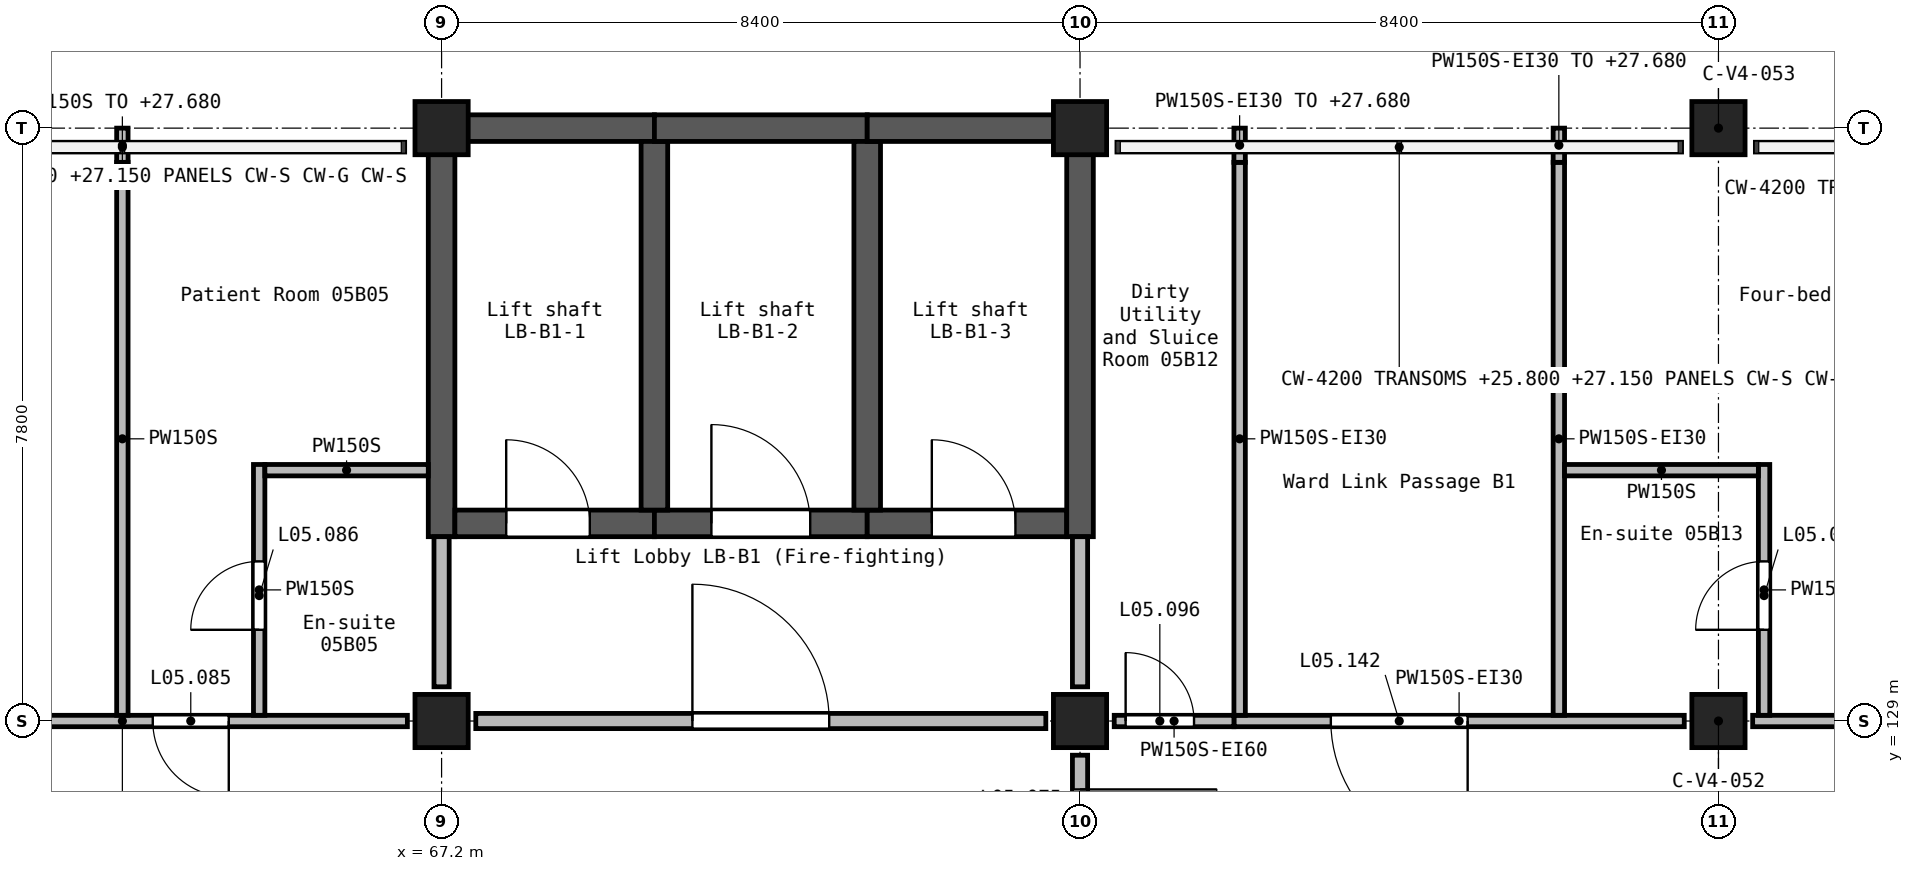
"""IFC4 building model, lengths in metres.
Left out: names, types, materials, properties, quantities, classifications, styles, units other than length and angle.
Written with IfcOpenShell. Run it as: python <this file> out.ifc"""

import sys

from ifc_helpers import new_model, si_unit, direction, frame, frame_2d, origin, origin_2d, place, context, subcontext, project, spatial, rectangle, extrude, element, fill, save


model = new_model("IFC4")
c1 = context("Model", 3, precision=1e-05, world=origin(), true_north=direction((0.0, 1.0)))
c2 = subcontext(c1, "Body", "Model", "MODEL_VIEW")
j1 = project(units=[si_unit("LENGTHUNIT", "METRE"), si_unit("PLANEANGLEUNIT", "RADIAN")], contexts=[c1])
p1 = place(None, origin())
s1 = spatial("IfcSite", under=j1, at=p1, CompositionType="ELEMENT")
p2 = place(p1, origin())
s2 = spatial("IfcBuilding", under=s1, at=p2, CompositionType="ELEMENT")
p3 = place(p2, frame((0.0, 0.0, 24.9)))
s3 = spatial("IfcBuildingStorey", under=s2, at=p3, CompositionType="ELEMENT", Elevation=24.9)
for number, where, z_axis, x_axis in (
    (1, (67.2, 129.0, 0.0), (0.0, 0.0, 1.0), (1.0, 0.0, 0.0)),
    (2, (67.2, 136.8, 0.0), (0.0, 0.0, 1.0), (1.0, 0.0, 0.0)),
    (3, (75.6, 129.0, 0.0), (0.0, 0.0, 1.0), (1.0, 0.0, 0.0)),
    (4, (75.6, 136.8, 0.0), (0.0, 0.0, 1.0), (1.0, 0.0, 0.0)),
    (5, (84.0, 129.0, 0.0), (0.0, 0.0, 1.0), (1.0, 0.0, 0.0)),
    (6, (84.0, 136.8, 0.0), (0.0, 0.0, 1.0), (1.0, 0.0, 0.0)),
):
    element("IfcColumn", number, at=place(p3, frame(where, z_axis=z_axis, x_axis=x_axis)), inside=s3, PredefinedType="COLUMN", context=c2, shape_type="SweptSolid", body=[
        extrude(rectangle(XDim=0.7, YDim=0.7, at=origin_2d()), origin(), (0.0, 0.0, 1.0), 3.9),
    ])
p4 = place(p3, frame((67.025, 136.8, 0.0), z_axis=(0.0, 0.0, 1.0), x_axis=(1.0, 0.0, 0.0)))
e7 = element("IfcWall", 7, at=p4, inside=s3, PredefinedType="SHEAR", context=c2, shape_type="SweptSolid", body=[
    extrude(rectangle(XDim=2.975, YDim=0.35, at=frame_2d((1.488, 0.0))), origin(), (0.0, 0.0, 1.0), 3.9),
])
p5 = place(p3, frame((67.2, 131.425, 0.0), z_axis=(0.0, 0.0, 1.0), x_axis=(0.0, 1.0, 0.0)))
e8 = element("IfcWall", 8, at=p5, inside=s3, PredefinedType="SHEAR", context=c2, shape_type="SweptSolid", body=[
    extrude(rectangle(XDim=5.2, YDim=0.35, at=frame_2d((2.6, 0.0))), origin(), (0.0, 0.0, 1.0), 3.9),
])
p6 = place(p3, frame((67.375, 131.6, 0.0), z_axis=(0.0, 0.0, 1.0), x_axis=(1.0, 0.0, 0.0)))
e9 = element("IfcWall", 9, at=p6, inside=s3, PredefinedType="SHEAR", context=c2, shape_type="SweptSolid", body=[
    extrude(rectangle(XDim=2.625, YDim=0.35, at=frame_2d((1.312, 0.0))), origin(), (0.0, 0.0, 1.0), 3.9),
])
p7 = place(p6, frame((0.675, 0.0, 0.0)))
e10 = element("IfcOpeningElement", 10, at=p7, cuts=e9, PredefinedType="OPENING", context=c2, shape_type="SweptSolid", body=[
    extrude(rectangle(XDim=1.1, YDim=2.1, at=frame_2d((0.55, 1.05))), frame((0.0, 0.185, 0.0), z_axis=(0.0, -1.0, 0.0), x_axis=(1.0, 0.0, 0.0)), (0.0, 0.0, 1.0), 0.37),
])
p8 = place(p3, frame((70.0, 131.6, 0.0), z_axis=(0.0, 0.0, 1.0), x_axis=(1.0, 0.0, 0.0)))
e11 = element("IfcWall", 11, at=p8, inside=s3, PredefinedType="SHEAR", context=c2, shape_type="SweptSolid", body=[
    extrude(rectangle(XDim=2.8, YDim=0.35, at=frame_2d((1.4, 0.0))), origin(), (0.0, 0.0, 1.0), 3.9),
])
p9 = place(p8, frame((0.75, 0.0, 0.0)))
e12 = element("IfcOpeningElement", 12, at=p9, cuts=e11, PredefinedType="OPENING", context=c2, shape_type="SweptSolid", body=[
    extrude(rectangle(XDim=1.3, YDim=2.1, at=frame_2d((0.65, 1.05))), frame((0.0, 0.185, 0.0), z_axis=(0.0, -1.0, 0.0), x_axis=(1.0, 0.0, 0.0)), (0.0, 0.0, 1.0), 0.37),
])
p10 = place(p3, frame((70.0, 131.775, 0.0), z_axis=(0.0, 0.0, 1.0), x_axis=(0.0, 1.0, 0.0)))
e13 = element("IfcWall", 13, at=p10, inside=s3, PredefinedType="SHEAR", context=c2, shape_type="SweptSolid", body=[
    extrude(rectangle(XDim=4.85, YDim=0.35, at=frame_2d((2.425, 0.0))), origin(), (0.0, 0.0, 1.0), 3.9),
])
p11 = place(p3, frame((70.0, 136.8, 0.0), z_axis=(0.0, 0.0, 1.0), x_axis=(1.0, 0.0, 0.0)))
e14 = element("IfcWall", 14, at=p11, inside=s3, PredefinedType="SHEAR", context=c2, shape_type="SweptSolid", body=[
    extrude(rectangle(XDim=2.8, YDim=0.35, at=frame_2d((1.4, 0.0))), origin(), (0.0, 0.0, 1.0), 3.9),
])
p12 = place(p3, frame((72.8, 131.6, 0.0), z_axis=(0.0, 0.0, 1.0), x_axis=(1.0, 0.0, 0.0)))
e15 = element("IfcWall", 15, at=p12, inside=s3, PredefinedType="SHEAR", context=c2, shape_type="SweptSolid", body=[
    extrude(rectangle(XDim=2.625, YDim=0.35, at=frame_2d((1.312, 0.0))), origin(), (0.0, 0.0, 1.0), 3.9),
])
p13 = place(p12, frame((0.85, 0.0, 0.0)))
e16 = element("IfcOpeningElement", 16, at=p13, cuts=e15, PredefinedType="OPENING", context=c2, shape_type="SweptSolid", body=[
    extrude(rectangle(XDim=1.1, YDim=2.1, at=frame_2d((0.55, 1.05))), frame((0.0, 0.185, 0.0), z_axis=(0.0, -1.0, 0.0), x_axis=(1.0, 0.0, 0.0)), (0.0, 0.0, 1.0), 0.37),
])
p14 = place(p3, frame((72.8, 131.775, 0.0), z_axis=(0.0, 0.0, 1.0), x_axis=(0.0, 1.0, 0.0)))
e17 = element("IfcWall", 17, at=p14, inside=s3, PredefinedType="SHEAR", context=c2, shape_type="SweptSolid", body=[
    extrude(rectangle(XDim=4.85, YDim=0.35, at=frame_2d((2.425, 0.0))), origin(), (0.0, 0.0, 1.0), 3.9),
])
p15 = place(p3, frame((72.8, 136.8, 0.0), z_axis=(0.0, 0.0, 1.0), x_axis=(1.0, 0.0, 0.0)))
e18 = element("IfcWall", 18, at=p15, inside=s3, PredefinedType="SHEAR", context=c2, shape_type="SweptSolid", body=[
    extrude(rectangle(XDim=2.625, YDim=0.35, at=frame_2d((1.312, 0.0))), origin(), (0.0, 0.0, 1.0), 3.9),
])
p16 = place(p3, frame((75.6, 131.425, 0.0), z_axis=(0.0, 0.0, 1.0), x_axis=(0.0, 1.0, 0.0)))
e19 = element("IfcWall", 19, at=p16, inside=s3, PredefinedType="SHEAR", context=c2, shape_type="SweptSolid", body=[
    extrude(rectangle(XDim=5.55, YDim=0.35, at=frame_2d((2.775, 0.0))), origin(), (0.0, 0.0, 1.0), 3.9),
])
p17 = place(p3, frame((75.6, 131.425, 0.0), z_axis=(0.0, 0.0, 1.0), x_axis=(0.0, -1.0, 0.0)))
e20 = element("IfcWall", 20, at=p17, inside=s3, PredefinedType="SOLIDWALL", context=c2, shape_type="SweptSolid", body=[
    extrude(rectangle(XDim=1.975, YDim=0.2, at=frame_2d((0.988, 0.0))), origin(), (0.0, 0.0, 1.0), 3.6),
])
p18 = place(p3, frame((75.6, 128.55, 0.0), z_axis=(0.0, 0.0, 1.0), x_axis=(0.0, -1.0, 0.0)))
e21 = element("IfcWall", 21, at=p18, inside=s3, PredefinedType="SOLIDWALL", context=c2, shape_type="SweptSolid", body=[
    extrude(rectangle(XDim=2.7, YDim=0.2, at=frame_2d((1.35, 0.0))), origin(), (0.0, 0.0, 1.0), 3.6),
])
p19 = place(p18, frame((0.45, 0.0, 0.0)))
e22 = element("IfcOpeningElement", 22, at=p19, cuts=e21, PredefinedType="OPENING", context=c2, shape_type="SweptSolid", body=[
    extrude(rectangle(XDim=1.8, YDim=2.1, at=frame_2d((0.9, 1.05))), frame((0.0, 0.11, 0.0), z_axis=(0.0, -1.0, 0.0), x_axis=(1.0, 0.0, 0.0)), (0.0, 0.0, 1.0), 0.22),
])
p20 = place(p3, frame((67.65, 129.0, 0.0), z_axis=(0.0, 0.0, 1.0), x_axis=(1.0, 0.0, 0.0)))
e23 = element("IfcWall", 23, at=p20, inside=s3, PredefinedType="SOLIDWALL", context=c2, shape_type="SweptSolid", body=[
    extrude(rectangle(XDim=7.5, YDim=0.2, at=frame_2d((3.75, 0.0))), origin(), (0.0, 0.0, 1.0), 3.6),
])
p21 = place(p20, frame((2.85, 0.0, 0.0)))
e24 = element("IfcOpeningElement", 24, at=p21, cuts=e23, PredefinedType="OPENING", context=c2, shape_type="SweptSolid", body=[
    extrude(rectangle(XDim=1.8, YDim=2.1, at=frame_2d((0.9, 1.05))), frame((0.0, 0.11, 0.0), z_axis=(0.0, -1.0, 0.0), x_axis=(1.0, 0.0, 0.0)), (0.0, 0.0, 1.0), 0.22),
])
p22 = place(p3, frame((67.2, 129.45, 0.0), z_axis=(0.0, 0.0, 1.0), x_axis=(0.0, 1.0, 0.0)))
e25 = element("IfcWall", 25, at=p22, inside=s3, PredefinedType="SOLIDWALL", context=c2, shape_type="SweptSolid", body=[
    extrude(rectangle(XDim=1.975, YDim=0.2, at=frame_2d((0.988, 0.0))), origin(), (0.0, 0.0, 1.0), 3.6),
])
p23 = place(p3, frame((91.95, 129.0, 0.0), z_axis=(0.0, 0.0, 1.0), x_axis=(-1.0, 0.0, 0.0)))
e26 = element("IfcWall", 26, at=p23, inside=s3, PredefinedType="PARTITIONING", context=c2, shape_type="SweptSolid", body=[
    extrude(rectangle(XDim=7.5, YDim=0.15, at=frame_2d((3.75, 0.0))), origin(), (0.0, 0.0, 1.0), 3.6),
])
p24 = place(p23, frame((4.0, 0.0, 0.0)))
e27 = element("IfcOpeningElement", 27, at=p24, cuts=e26, PredefinedType="OPENING", context=c2, shape_type="SweptSolid", body=[
    extrude(rectangle(XDim=1.0, YDim=2.1, at=frame_2d((0.5, 1.05))), frame((0.0, 0.085, 0.0), z_axis=(0.0, -1.0, 0.0), x_axis=(1.0, 0.0, 0.0)), (0.0, 0.0, 1.0), 0.17),
])
p25 = place(p3, frame((83.55, 129.0, 0.0), z_axis=(0.0, 0.0, 1.0), x_axis=(-1.0, 0.0, 0.0)))
e28 = element("IfcWall", 28, at=p25, inside=s3, PredefinedType="PARTITIONING", context=c2, shape_type="SweptSolid", body=[
    extrude(rectangle(XDim=5.925, YDim=0.15, at=frame_2d((2.962, 0.0))), origin(), (0.0, 0.0, 1.0), 3.6),
])
p26 = place(p25, frame((2.85, 0.0, 0.0)))
e29 = element("IfcOpeningElement", 29, at=p26, cuts=e28, PredefinedType="OPENING", context=c2, shape_type="SweptSolid", body=[
    extrude(rectangle(XDim=1.8, YDim=2.1, at=frame_2d((0.9, 1.05))), frame((0.0, 0.085, 0.0), z_axis=(0.0, -1.0, 0.0), x_axis=(1.0, 0.0, 0.0)), (0.0, 0.0, 1.0), 0.17),
])
p27 = place(p3, frame((66.75, 129.0, 0.0), z_axis=(0.0, 0.0, 1.0), x_axis=(-1.0, 0.0, 0.0)))
e30 = element("IfcWall", 30, at=p27, inside=s3, PredefinedType="PARTITIONING", context=c2, shape_type="SweptSolid", body=[
    extrude(rectangle(XDim=7.5, YDim=0.15, at=frame_2d((3.75, 0.0))), origin(), (0.0, 0.0, 1.0), 3.6),
])
p28 = place(p27, frame((5.05, 0.0, 0.0)))
e31 = element("IfcOpeningElement", 31, at=p28, cuts=e30, PredefinedType="OPENING", context=c2, shape_type="SweptSolid", body=[
    extrude(rectangle(XDim=1.0, YDim=2.1, at=frame_2d((0.5, 1.05))), frame((0.0, 0.085, 0.0), z_axis=(0.0, -1.0, 0.0), x_axis=(1.0, 0.0, 0.0)), (0.0, 0.0, 1.0), 0.17),
])
p29 = place(p27, frame((2.35, 0.0, 0.0)))
e32 = element("IfcOpeningElement", 32, at=p29, cuts=e30, PredefinedType="OPENING", context=c2, shape_type="SweptSolid", body=[
    extrude(rectangle(XDim=1.0, YDim=2.1, at=frame_2d((0.5, 1.05))), frame((0.0, 0.085, 0.0), z_axis=(0.0, -1.0, 0.0), x_axis=(1.0, 0.0, 0.0)), (0.0, 0.0, 1.0), 0.17),
])
p30 = place(p3, frame((77.7, 129.075, 0.0), z_axis=(0.0, 0.0, 1.0), x_axis=(0.0, 1.0, 0.0)))
e33 = element("IfcWall", 33, at=p30, inside=s3, PredefinedType="PARTITIONING", context=c2, shape_type="SweptSolid", body=[
    extrude(rectangle(XDim=7.275, YDim=0.15, at=frame_2d((3.638, 0.0))), origin(), (0.0, 0.0, 1.0), 3.6),
])
p31 = place(p3, frame((77.7, 136.35, 0.0), z_axis=(0.0, 0.0, 1.0), x_axis=(0.0, 1.0, 0.0)))
e34 = element("IfcWall", 34, at=p31, inside=s3, PredefinedType="PARTITIONING", context=c2, shape_type="SweptSolid", body=[
    extrude(rectangle(XDim=0.45, YDim=0.15, at=frame_2d((0.225, 0.0))), origin(), (0.0, 0.0, 1.0), 2.78),
])
p32 = place(p3, frame((81.9, 129.075, 0.0), z_axis=(0.0, 0.0, 1.0), x_axis=(0.0, 1.0, 0.0)))
e35 = element("IfcWall", 35, at=p32, inside=s3, PredefinedType="PARTITIONING", context=c2, shape_type="SweptSolid", body=[
    extrude(rectangle(XDim=7.275, YDim=0.15, at=frame_2d((3.638, 0.0))), origin(), (0.0, 0.0, 1.0), 3.6),
])
p33 = place(p3, frame((81.9, 136.35, 0.0), z_axis=(0.0, 0.0, 1.0), x_axis=(0.0, 1.0, 0.0)))
e36 = element("IfcWall", 36, at=p33, inside=s3, PredefinedType="PARTITIONING", context=c2, shape_type="SweptSolid", body=[
    extrude(rectangle(XDim=0.45, YDim=0.15, at=frame_2d((0.225, 0.0))), origin(), (0.0, 0.0, 1.0), 2.78),
])
p34 = place(p3, frame((76.05, 129.0, 0.0), z_axis=(0.0, 0.0, 1.0), x_axis=(1.0, 0.0, 0.0)))
e37 = element("IfcWall", 37, at=p34, inside=s3, PredefinedType="PARTITIONING", context=c2, shape_type="SweptSolid", body=[
    extrude(rectangle(XDim=1.575, YDim=0.15, at=frame_2d((0.788, 0.0))), origin(), (0.0, 0.0, 1.0), 3.6),
])
p35 = place(p34, frame((0.15, 0.0, 0.0)))
e38 = element("IfcOpeningElement", 38, at=p35, cuts=e37, PredefinedType="OPENING", context=c2, shape_type="SweptSolid", body=[
    extrude(rectangle(XDim=0.9, YDim=2.1, at=frame_2d((0.45, 1.05))), frame((0.0, 0.085, 0.0), z_axis=(0.0, -1.0, 0.0), x_axis=(1.0, 0.0, 0.0)), (0.0, 0.0, 1.0), 0.17),
])
p36 = place(p3, frame((63.0, 129.075, 0.0), z_axis=(0.0, 0.0, 1.0), x_axis=(0.0, 1.0, 0.0)))
e39 = element("IfcWall", 39, at=p36, inside=s3, PredefinedType="PARTITIONING", context=c2, shape_type="SweptSolid", body=[
    extrude(rectangle(XDim=7.275, YDim=0.15, at=frame_2d((3.638, 0.0))), origin(), (0.0, 0.0, 1.0), 3.6),
])
p37 = place(p3, frame((63.0, 136.35, 0.0), z_axis=(0.0, 0.0, 1.0), x_axis=(0.0, 1.0, 0.0)))
e40 = element("IfcWall", 40, at=p37, inside=s3, PredefinedType="PARTITIONING", context=c2, shape_type="SweptSolid", body=[
    extrude(rectangle(XDim=0.45, YDim=0.15, at=frame_2d((0.225, 0.0))), origin(), (0.0, 0.0, 1.0), 2.78),
])
p38 = place(p3, frame((64.8, 129.075, 0.0), z_axis=(0.0, 0.0, 1.0), x_axis=(0.0, 1.0, 0.0)))
e41 = element("IfcWall", 41, at=p38, inside=s3, PredefinedType="PARTITIONING", context=c2, shape_type="SweptSolid", body=[
    extrude(rectangle(XDim=3.3, YDim=0.15, at=frame_2d((1.65, 0.0))), origin(), (0.0, 0.0, 1.0), 3.6),
])
p39 = place(p38, frame((1.125, 0.0, 0.0)))
e42 = element("IfcOpeningElement", 42, at=p39, cuts=e41, PredefinedType="OPENING", context=c2, shape_type="SweptSolid", body=[
    extrude(rectangle(XDim=0.9, YDim=2.1, at=frame_2d((0.45, 1.05))), frame((0.0, 0.085, 0.0), z_axis=(0.0, -1.0, 0.0), x_axis=(1.0, 0.0, 0.0)), (0.0, 0.0, 1.0), 0.17),
])
p40 = place(p3, frame((84.6, 129.075, 0.0), z_axis=(0.0, 0.0, 1.0), x_axis=(0.0, 1.0, 0.0)))
e43 = element("IfcWall", 43, at=p40, inside=s3, PredefinedType="PARTITIONING", context=c2, shape_type="SweptSolid", body=[
    extrude(rectangle(XDim=3.3, YDim=0.15, at=frame_2d((1.65, 0.0))), origin(), (0.0, 0.0, 1.0), 3.6),
])
p41 = place(p40, frame((1.125, 0.0, 0.0)))
e44 = element("IfcOpeningElement", 44, at=p41, cuts=e43, PredefinedType="OPENING", context=c2, shape_type="SweptSolid", body=[
    extrude(rectangle(XDim=0.9, YDim=2.1, at=frame_2d((0.45, 1.05))), frame((0.0, 0.085, 0.0), z_axis=(0.0, -1.0, 0.0), x_axis=(1.0, 0.0, 0.0)), (0.0, 0.0, 1.0), 0.17),
])
p42 = place(p3, frame((81.975, 132.3, 0.0), z_axis=(0.0, 0.0, 1.0), x_axis=(1.0, 0.0, 0.0)))
e45 = element("IfcWall", 45, at=p42, inside=s3, PredefinedType="PARTITIONING", context=c2, shape_type="SweptSolid", body=[
    extrude(rectangle(XDim=2.55, YDim=0.15, at=frame_2d((1.275, 0.0))), origin(), (0.0, 0.0, 1.0), 3.6),
])
p43 = place(p3, frame((64.875, 132.3, 0.0), z_axis=(0.0, 0.0, 1.0), x_axis=(1.0, 0.0, 0.0)))
e46 = element("IfcWall", 46, at=p43, inside=s3, PredefinedType="PARTITIONING", context=c2, shape_type="SweptSolid", body=[
    extrude(rectangle(XDim=2.15, YDim=0.15, at=frame_2d((1.075, 0.0))), origin(), (0.0, 0.0, 1.0), 3.6),
])
p44 = place(p19, origin())
e47 = element("IfcDoor", 47, at=p44, inside=s3, OperationType="DOUBLE_DOOR_SINGLE_SWING", PredefinedType="DOOR", context=c2, shape_type="SweptSolid", body=[
    extrude(rectangle(XDim=1.8, YDim=2.1, at=frame_2d((0.9, 1.05))), frame((0.0, 0.025, 0.0), z_axis=(0.0, -1.0, 0.0), x_axis=(1.0, 0.0, 0.0)), (0.0, 0.0, 1.0), 0.05),
])
fill(e22, e47)
p45 = place(p29, frame((1.0, 0.0, 0.0), z_axis=(0.0, 0.0, 1.0), x_axis=(-1.0, 0.0, 0.0)))
e48 = element("IfcDoor", 48, at=p45, inside=s3, OperationType="SINGLE_SWING_RIGHT", PredefinedType="DOOR", context=c2, shape_type="SweptSolid", body=[
    extrude(rectangle(XDim=1.0, YDim=2.1, at=frame_2d((0.5, 1.05))), frame((0.0, 0.025, 0.0), z_axis=(0.0, -1.0, 0.0), x_axis=(1.0, 0.0, 0.0)), (0.0, 0.0, 1.0), 0.05),
])
fill(e32, e48)
p46 = place(p39, frame((0.9, 0.0, 0.0), z_axis=(0.0, 0.0, 1.0), x_axis=(-1.0, 0.0, 0.0)))
e49 = element("IfcDoor", 49, at=p46, inside=s3, OperationType="SINGLE_SWING_RIGHT", PredefinedType="DOOR", context=c2, shape_type="SweptSolid", body=[
    extrude(rectangle(XDim=0.9, YDim=2.1, at=frame_2d((0.45, 1.05))), frame((0.0, 0.025, 0.0), z_axis=(0.0, -1.0, 0.0), x_axis=(1.0, 0.0, 0.0)), (0.0, 0.0, 1.0), 0.05),
])
fill(e42, e49)
p47 = place(p35, origin())
e50 = element("IfcDoor", 50, at=p47, inside=s3, OperationType="SINGLE_SWING_LEFT", PredefinedType="DOOR", context=c2, shape_type="SweptSolid", body=[
    extrude(rectangle(XDim=0.9, YDim=2.1, at=frame_2d((0.45, 1.05))), frame((0.0, 0.025, 0.0), z_axis=(0.0, -1.0, 0.0), x_axis=(1.0, 0.0, 0.0)), (0.0, 0.0, 1.0), 0.05),
])
fill(e38, e50)
p48 = place(p41, origin())
e51 = element("IfcDoor", 51, at=p48, inside=s3, OperationType="SINGLE_SWING_LEFT", PredefinedType="DOOR", context=c2, shape_type="SweptSolid", body=[
    extrude(rectangle(XDim=0.9, YDim=2.1, at=frame_2d((0.45, 1.05))), frame((0.0, 0.025, 0.0), z_axis=(0.0, -1.0, 0.0), x_axis=(1.0, 0.0, 0.0)), (0.0, 0.0, 1.0), 0.05),
])
fill(e44, e51)
p49 = place(p26, frame((1.8, 0.0, 0.0), z_axis=(0.0, 0.0, 1.0), x_axis=(-1.0, 0.0, 0.0)))
e52 = element("IfcDoor", 52, at=p49, inside=s3, OperationType="DOUBLE_DOOR_SINGLE_SWING", PredefinedType="DOOR", context=c2, shape_type="SweptSolid", body=[
    extrude(rectangle(XDim=1.8, YDim=2.1, at=frame_2d((0.9, 1.05))), frame((0.0, 0.025, 0.0), z_axis=(0.0, -1.0, 0.0), x_axis=(1.0, 0.0, 0.0)), (0.0, 0.0, 1.0), 0.05),
])
fill(e29, e52)
p50 = place(p21, origin())
e53 = element("IfcDoor", 53, at=p50, inside=s3, OperationType="DOUBLE_DOOR_SINGLE_SWING", PredefinedType="DOOR", context=c2, shape_type="SweptSolid", body=[
    extrude(rectangle(XDim=1.8, YDim=2.1, at=frame_2d((0.9, 1.05))), frame((0.0, 0.025, 0.0), z_axis=(0.0, -1.0, 0.0), x_axis=(1.0, 0.0, 0.0)), (0.0, 0.0, 1.0), 0.05),
])
fill(e24, e53)
p51 = place(p7, origin())
e54 = element("IfcDoor", 54, at=p51, inside=s3, OperationType="DOUBLE_DOOR_SLIDING", PredefinedType="DOOR", context=c2, shape_type="SweptSolid", body=[
    extrude(rectangle(XDim=1.1, YDim=2.1, at=frame_2d((0.55, 1.05))), frame((0.0, 0.025, 0.0), z_axis=(0.0, -1.0, 0.0), x_axis=(1.0, 0.0, 0.0)), (0.0, 0.0, 1.0), 0.05),
])
fill(e10, e54)
p52 = place(p9, origin())
e55 = element("IfcDoor", 55, at=p52, inside=s3, OperationType="DOUBLE_DOOR_SLIDING", PredefinedType="DOOR", context=c2, shape_type="SweptSolid", body=[
    extrude(rectangle(XDim=1.3, YDim=2.1, at=frame_2d((0.65, 1.05))), frame((0.0, 0.025, 0.0), z_axis=(0.0, -1.0, 0.0), x_axis=(1.0, 0.0, 0.0)), (0.0, 0.0, 1.0), 0.05),
])
fill(e12, e55)
p53 = place(p13, origin())
e56 = element("IfcDoor", 56, at=p53, inside=s3, OperationType="DOUBLE_DOOR_SLIDING", PredefinedType="DOOR", context=c2, shape_type="SweptSolid", body=[
    extrude(rectangle(XDim=1.1, YDim=2.1, at=frame_2d((0.55, 1.05))), frame((0.0, 0.025, 0.0), z_axis=(0.0, -1.0, 0.0), x_axis=(1.0, 0.0, 0.0)), (0.0, 0.0, 1.0), 0.05),
])
fill(e16, e56)
save(model, sys.argv[1])
